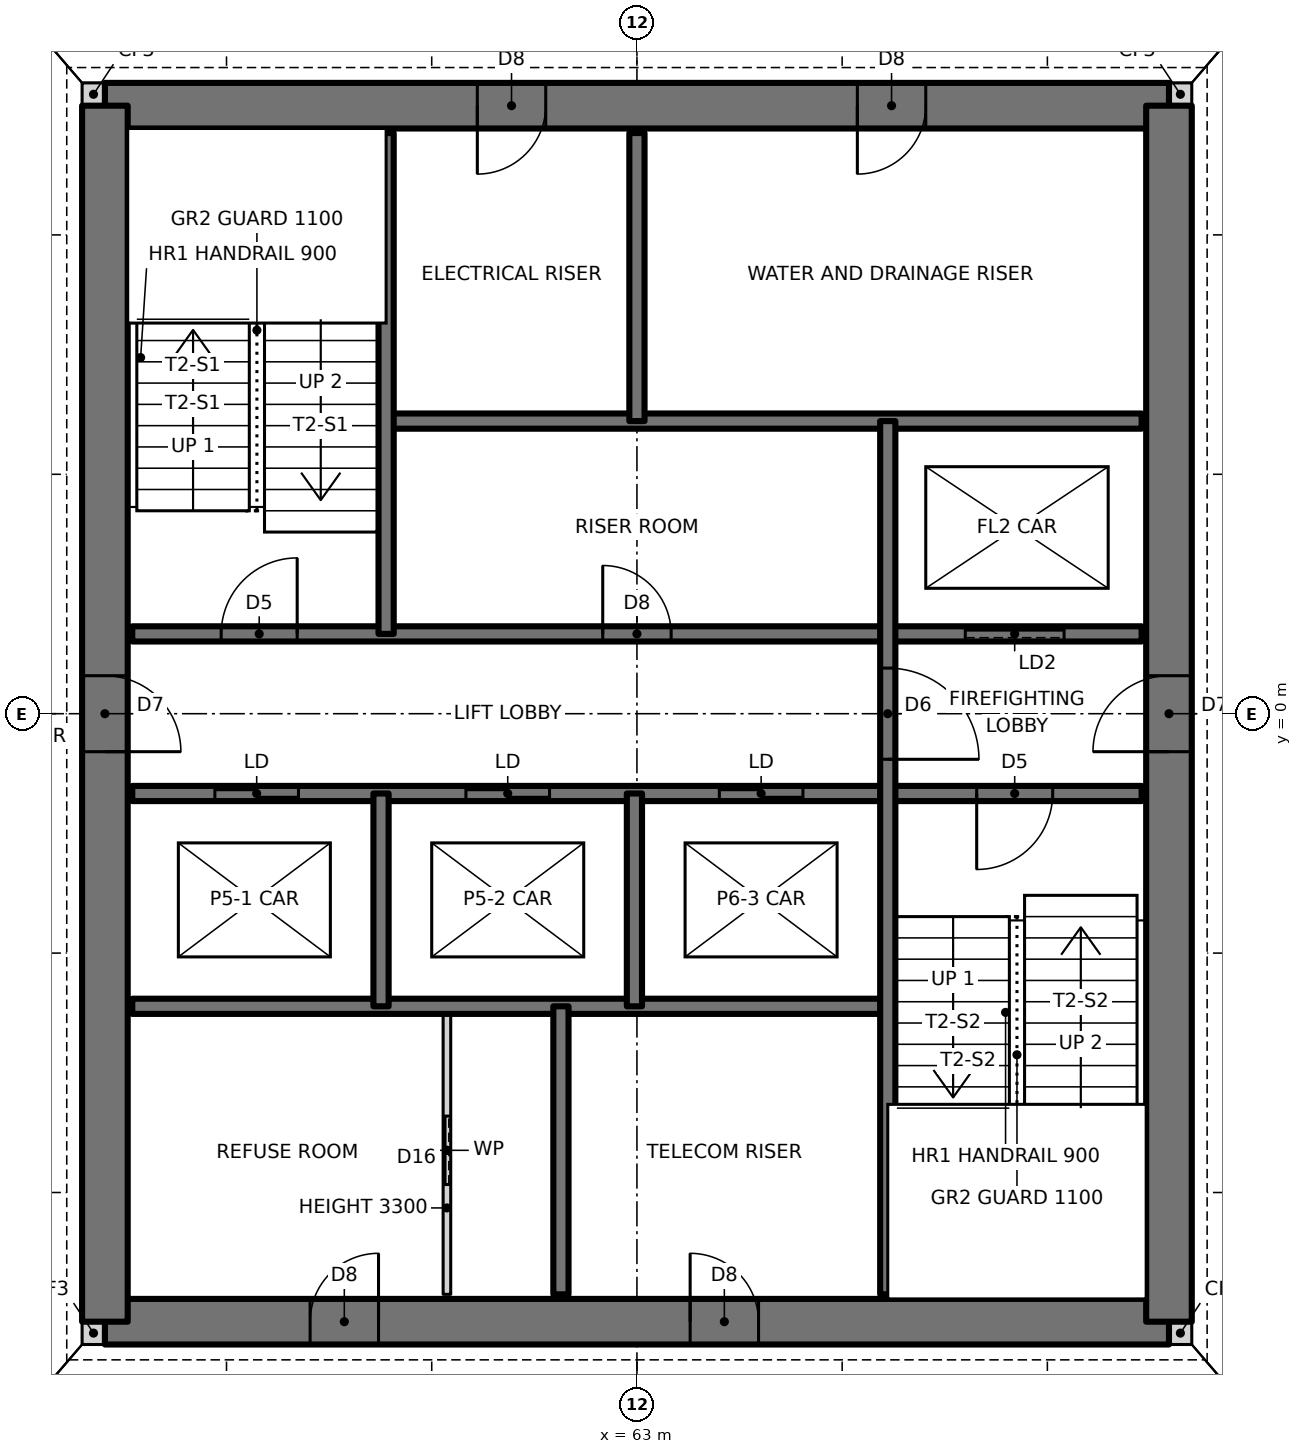
"""IFC4 building model, lengths in metres.
Left out: names, types, materials, properties, quantities, classifications, styles, units other than length and angle.
Written with IfcOpenShell. Run it as: python <this file> out.ifc"""

import sys

from ifc_helpers import new_model, si_unit, direction, frame, frame_2d, origin, place, context, subcontext, project, spatial, rectangle, extrude, element, fill, save


model = new_model("IFC4")
c1 = context("Model", 3, precision=1e-05, world=origin(), true_north=direction((0.0, 1.0)))
c2 = subcontext(c1, "Body", "Model", "MODEL_VIEW")
j1 = project(units=[si_unit("LENGTHUNIT", "METRE"), si_unit("PLANEANGLEUNIT", "RADIAN")], contexts=[c1])
p1 = place(None, origin())
s1 = spatial("IfcSite", under=j1, at=p1, CompositionType="ELEMENT")
p2 = place(p1, origin())
s2 = spatial("IfcBuilding", under=s1, at=p2, CompositionType="ELEMENT")
p3 = place(p2, frame((0.0, 0.0, 43.0)))
s3 = spatial("IfcBuildingStorey", under=s2, at=p3, CompositionType="ELEMENT", Elevation=43.0)
for number, where, z_axis, x_axis in (
    (1, (55.7, -8.15, 0.0), (0.0, 0.0, 1.0), (1.0, 0.0, 0.0)),
    (2, (70.0, -8.15, 0.0), (0.0, 0.0, 1.0), (1.0, 0.0, 0.0)),
    (3, (70.0, 8.15, 0.0), (0.0, 0.0, 1.0), (1.0, 0.0, 0.0)),
    (4, (55.7, 8.15, 0.0), (0.0, 0.0, 1.0), (1.0, 0.0, 0.0)),
):
    element("IfcWall", number, at=place(p3, frame(where, z_axis=z_axis, x_axis=x_axis)), inside=s3, PredefinedType="SOLIDWALL", context=c2, shape_type="SweptSolid", body=[
        extrude(rectangle(XDim=0.3, YDim=0.3, at=frame_2d((0.15, 0.0))), origin(), (0.0, 0.0, 1.0), 3.5),
    ])
p4 = place(p3, frame((56.0, -8.0, 0.0), z_axis=(0.0, 0.0, 1.0), x_axis=(1.0, 0.0, 0.0)))
e5 = element("IfcWall", 5, at=p4, inside=s3, PredefinedType="SHEAR", context=c2, shape_type="SweptSolid", body=[
    extrude(rectangle(XDim=14.0, YDim=0.6, at=frame_2d((7.0, 0.0))), origin(), (0.0, 0.0, 1.0), 3.5),
])
p5 = place(p4, frame((2.7, 0.0, 0.0)))
e6 = element("IfcOpeningElement", 6, at=p5, cuts=e5, PredefinedType="OPENING", context=c2, shape_type="SweptSolid", body=[
    extrude(rectangle(XDim=0.9, YDim=2.1, at=frame_2d((0.45, 1.05))), frame((0.0, 0.31, 0.0), z_axis=(0.0, -1.0, 0.0), x_axis=(1.0, 0.0, 0.0)), (0.0, 0.0, 1.0), 0.62),
])
p6 = place(p4, frame((7.7, 0.0, 0.0)))
e7 = element("IfcOpeningElement", 7, at=p6, cuts=e5, PredefinedType="OPENING", context=c2, shape_type="SweptSolid", body=[
    extrude(rectangle(XDim=0.9, YDim=2.1, at=frame_2d((0.45, 1.05))), frame((0.0, 0.31, 0.0), z_axis=(0.0, -1.0, 0.0), x_axis=(1.0, 0.0, 0.0)), (0.0, 0.0, 1.0), 0.62),
])
p7 = place(p3, frame((70.0, 8.0, 0.0), z_axis=(0.0, 0.0, 1.0), x_axis=(-1.0, 0.0, 0.0)))
e8 = element("IfcWall", 8, at=p7, inside=s3, PredefinedType="SHEAR", context=c2, shape_type="SweptSolid", body=[
    extrude(rectangle(XDim=14.0, YDim=0.6, at=frame_2d((7.0, 0.0))), origin(), (0.0, 0.0, 1.0), 3.5),
])
p8 = place(p7, frame((8.2, 0.0, 0.0)))
e9 = element("IfcOpeningElement", 9, at=p8, cuts=e8, PredefinedType="OPENING", context=c2, shape_type="SweptSolid", body=[
    extrude(rectangle(XDim=0.9, YDim=2.1, at=frame_2d((0.45, 1.05))), frame((0.0, 0.31, 0.0), z_axis=(0.0, -1.0, 0.0), x_axis=(1.0, 0.0, 0.0)), (0.0, 0.0, 1.0), 0.62),
])
p9 = place(p7, frame((3.2, 0.0, 0.0)))
e10 = element("IfcOpeningElement", 10, at=p9, cuts=e8, PredefinedType="OPENING", context=c2, shape_type="SweptSolid", body=[
    extrude(rectangle(XDim=0.9, YDim=2.1, at=frame_2d((0.45, 1.05))), frame((0.0, 0.31, 0.0), z_axis=(0.0, -1.0, 0.0), x_axis=(1.0, 0.0, 0.0)), (0.0, 0.0, 1.0), 0.62),
])
p10 = place(p3, frame((70.0, -8.0, 0.0), z_axis=(0.0, 0.0, 1.0), x_axis=(0.0, 1.0, 0.0)))
e11 = element("IfcWall", 11, at=p10, inside=s3, PredefinedType="SHEAR", context=c2, shape_type="SweptSolid", body=[
    extrude(rectangle(XDim=16.0, YDim=0.6, at=frame_2d((8.0, 0.0))), origin(), (0.0, 0.0, 1.0), 3.5),
])
p11 = place(p10, frame((7.5, 0.0, 0.0)))
e12 = element("IfcOpeningElement", 12, at=p11, cuts=e11, PredefinedType="OPENING", context=c2, shape_type="SweptSolid", body=[
    extrude(rectangle(XDim=1.0, YDim=2.1, at=frame_2d((0.5, 1.05))), frame((0.0, 0.31, 0.0), z_axis=(0.0, -1.0, 0.0), x_axis=(1.0, 0.0, 0.0)), (0.0, 0.0, 1.0), 0.62),
])
p12 = place(p3, frame((56.0, 8.0, 0.0), z_axis=(0.0, 0.0, 1.0), x_axis=(0.0, -1.0, 0.0)))
e13 = element("IfcWall", 13, at=p12, inside=s3, PredefinedType="SHEAR", context=c2, shape_type="SweptSolid", body=[
    extrude(rectangle(XDim=16.0, YDim=0.6, at=frame_2d((8.0, 0.0))), origin(), (0.0, 0.0, 1.0), 3.5),
])
p13 = place(p12, frame((7.5, 0.0, 0.0)))
e14 = element("IfcOpeningElement", 14, at=p13, cuts=e13, PredefinedType="OPENING", context=c2, shape_type="SweptSolid", body=[
    extrude(rectangle(XDim=1.0, YDim=2.1, at=frame_2d((0.5, 1.05))), frame((0.0, 0.31, 0.0), z_axis=(0.0, -1.0, 0.0), x_axis=(1.0, 0.0, 0.0)), (0.0, 0.0, 1.0), 0.62),
])
p14 = place(p3, frame((56.36, -3.85, 0.0), z_axis=(0.0, 0.0, 1.0), x_axis=(1.0, 0.0, 0.0)))
e15 = element("IfcWall", 15, at=p14, inside=s3, PredefinedType="SOLIDWALL", context=c2, shape_type="SweptSolid", body=[
    extrude(rectangle(XDim=9.94, YDim=0.2, at=frame_2d((4.97, 0.0))), origin(), (0.0, 0.0, 1.0), 3.5),
])
p15 = place(p3, frame((56.36, -1.05, 0.0), z_axis=(0.0, 0.0, 1.0), x_axis=(1.0, 0.0, 0.0)))
e16 = element("IfcWall", 16, at=p15, inside=s3, PredefinedType="SOLIDWALL", context=c2, shape_type="SweptSolid", body=[
    extrude(rectangle(XDim=13.28, YDim=0.2, at=frame_2d((6.64, 0.0))), origin(), (0.0, 0.0, 1.0), 3.5),
])
p16 = place(p15, frame((11.11, 0.0, 0.0)))
e17 = element("IfcOpeningElement", 17, at=p16, cuts=e16, PredefinedType="OPENING", context=c2, shape_type="SweptSolid", body=[
    extrude(rectangle(XDim=1.0, YDim=2.1, at=frame_2d((0.5, 1.05))), frame((0.0, 0.11, 0.0), z_axis=(0.0, -1.0, 0.0), x_axis=(1.0, 0.0, 0.0)), (0.0, 0.0, 1.0), 0.22),
])
p17 = place(p15, frame((1.087, 0.0, 0.0)))
e18 = element("IfcOpeningElement", 18, at=p17, cuts=e16, PredefinedType="OPENING", context=c2, shape_type="SweptSolid", body=[
    extrude(rectangle(XDim=1.1, YDim=2.1, at=frame_2d((0.55, 1.05))), frame((0.0, 0.11, 0.0), z_axis=(0.0, -1.0, 0.0), x_axis=(1.0, 0.0, 0.0)), (0.0, 0.0, 1.0), 0.22),
])
p18 = place(p15, frame((4.39, 0.0, 0.0)))
e19 = element("IfcOpeningElement", 19, at=p18, cuts=e16, PredefinedType="OPENING", context=c2, shape_type="SweptSolid", body=[
    extrude(rectangle(XDim=1.1, YDim=2.1, at=frame_2d((0.55, 1.05))), frame((0.0, 0.11, 0.0), z_axis=(0.0, -1.0, 0.0), x_axis=(1.0, 0.0, 0.0)), (0.0, 0.0, 1.0), 0.22),
])
p19 = place(p15, frame((7.724, 0.0, 0.0)))
e20 = element("IfcOpeningElement", 20, at=p19, cuts=e16, PredefinedType="OPENING", context=c2, shape_type="SweptSolid", body=[
    extrude(rectangle(XDim=1.1, YDim=2.1, at=frame_2d((0.55, 1.05))), frame((0.0, 0.11, 0.0), z_axis=(0.0, -1.0, 0.0), x_axis=(1.0, 0.0, 0.0)), (0.0, 0.0, 1.0), 0.22),
])
p20 = place(p3, frame((56.36, 1.05, 0.0), z_axis=(0.0, 0.0, 1.0), x_axis=(1.0, 0.0, 0.0)))
e21 = element("IfcWall", 21, at=p20, inside=s3, PredefinedType="SOLIDWALL", context=c2, shape_type="SweptSolid", body=[
    extrude(rectangle(XDim=13.28, YDim=0.2, at=frame_2d((6.64, 0.0))), origin(), (0.0, 0.0, 1.0), 3.5),
])
p21 = place(p20, frame((1.17, 0.0, 0.0)))
e22 = element("IfcOpeningElement", 22, at=p21, cuts=e21, PredefinedType="OPENING", context=c2, shape_type="SweptSolid", body=[
    extrude(rectangle(XDim=1.0, YDim=2.1, at=frame_2d((0.5, 1.05))), frame((0.0, 0.11, 0.0), z_axis=(0.0, -1.0, 0.0), x_axis=(1.0, 0.0, 0.0)), (0.0, 0.0, 1.0), 0.22),
])
p22 = place(p20, frame((6.19, 0.0, 0.0)))
e23 = element("IfcOpeningElement", 23, at=p22, cuts=e21, PredefinedType="OPENING", context=c2, shape_type="SweptSolid", body=[
    extrude(rectangle(XDim=0.9, YDim=2.1, at=frame_2d((0.45, 1.05))), frame((0.0, 0.11, 0.0), z_axis=(0.0, -1.0, 0.0), x_axis=(1.0, 0.0, 0.0)), (0.0, 0.0, 1.0), 0.22),
])
p23 = place(p20, frame((10.96, 0.0, 0.0)))
e24 = element("IfcOpeningElement", 24, at=p23, cuts=e21, PredefinedType="OPENING", context=c2, shape_type="SweptSolid", body=[
    extrude(rectangle(XDim=1.3, YDim=2.1, at=frame_2d((0.65, 1.05))), frame((0.0, 0.11, 0.0), z_axis=(0.0, -1.0, 0.0), x_axis=(1.0, 0.0, 0.0)), (0.0, 0.0, 1.0), 0.22),
])
p24 = place(p3, frame((59.7, 3.85, 0.0), z_axis=(0.0, 0.0, 1.0), x_axis=(1.0, 0.0, 0.0)))
e25 = element("IfcWall", 25, at=p24, inside=s3, PredefinedType="SOLIDWALL", context=c2, shape_type="SweptSolid", body=[
    extrude(rectangle(XDim=9.94, YDim=0.2, at=frame_2d((4.97, 0.0))), origin(), (0.0, 0.0, 1.0), 3.5),
])
p25 = place(p3, frame((66.3, -7.64, 0.0), z_axis=(0.0, 0.0, 1.0), x_axis=(0.0, 1.0, 0.0)))
e26 = element("IfcWall", 26, at=p25, inside=s3, PredefinedType="SOLIDWALL", context=c2, shape_type="SweptSolid", body=[
    extrude(rectangle(XDim=11.49, YDim=0.2, at=frame_2d((5.745, 0.0))), origin(), (0.0, 0.0, 1.0), 3.5),
])
p26 = place(p25, frame((7.04, 0.0, 0.0)))
e27 = element("IfcOpeningElement", 27, at=p26, cuts=e26, PredefinedType="OPENING", context=c2, shape_type="SweptSolid", body=[
    extrude(rectangle(XDim=1.2, YDim=2.1, at=frame_2d((0.6, 1.05))), frame((0.0, 0.11, 0.0), z_axis=(0.0, -1.0, 0.0), x_axis=(1.0, 0.0, 0.0)), (0.0, 0.0, 1.0), 0.22),
])
p27 = place(p3, frame((63.0, 3.85, 0.0), z_axis=(0.0, 0.0, 1.0), x_axis=(0.0, 1.0, 0.0)))
e28 = element("IfcWall", 28, at=p27, inside=s3, PredefinedType="SOLIDWALL", context=c2, shape_type="SweptSolid", body=[
    extrude(rectangle(XDim=3.79, YDim=0.2, at=frame_2d((1.895, 0.0))), origin(), (0.0, 0.0, 1.0), 3.5),
])
p28 = place(p3, frame((62.967, -3.85, 0.0), z_axis=(0.0, 0.0, 1.0), x_axis=(0.0, 1.0, 0.0)))
e29 = element("IfcWall", 29, at=p28, inside=s3, PredefinedType="SOLIDWALL", context=c2, shape_type="SweptSolid", body=[
    extrude(rectangle(XDim=2.8, YDim=0.2, at=frame_2d((1.4, 0.0))), origin(), (0.0, 0.0, 1.0), 3.5),
])
p29 = place(p3, frame((62.0, -7.64, 0.0), z_axis=(0.0, 0.0, 1.0), x_axis=(0.0, 1.0, 0.0)))
e30 = element("IfcWall", 30, at=p29, inside=s3, PredefinedType="SOLIDWALL", context=c2, shape_type="SweptSolid", body=[
    extrude(rectangle(XDim=3.79, YDim=0.2, at=frame_2d((1.895, 0.0))), origin(), (0.0, 0.0, 1.0), 3.5),
])
p30 = place(p3, frame((60.5, -7.64, 0.0), z_axis=(0.0, 0.0, 1.0), x_axis=(0.0, 1.0, 0.0)))
e31 = element("IfcWall", 31, at=p30, inside=s3, PredefinedType="PARTITIONING", context=c2, shape_type="SweptSolid", body=[
    extrude(rectangle(XDim=3.79, YDim=0.1, at=frame_2d((1.895, 0.0))), origin(), (0.0, 0.0, 1.0), 3.3),
])
p31 = place(p30, frame((1.445, 0.0, 0.0)))
e32 = element("IfcOpeningElement", 32, at=p31, cuts=e31, PredefinedType="OPENING", context=c2, shape_type="SweptSolid", body=[
    extrude(rectangle(XDim=0.9, YDim=2.1, at=frame_2d((0.45, 1.05))), frame((0.0, 0.06, 0.0), z_axis=(0.0, -1.0, 0.0), x_axis=(1.0, 0.0, 0.0)), (0.0, 0.0, 1.0), 0.12),
])
p32 = place(p3, frame((59.7, 1.05, 0.0), z_axis=(0.0, 0.0, 1.0), x_axis=(0.0, 1.0, 0.0)))
e33 = element("IfcWall", 33, at=p32, inside=s3, PredefinedType="SOLIDWALL", context=c2, shape_type="SweptSolid", body=[
    extrude(rectangle(XDim=6.59, YDim=0.2, at=frame_2d((3.295, 0.0))), origin(), (0.0, 0.0, 1.0), 3.5),
])
p33 = place(p3, frame((59.633, -3.85, 0.0), z_axis=(0.0, 0.0, 1.0), x_axis=(0.0, 1.0, 0.0)))
e34 = element("IfcWall", 34, at=p33, inside=s3, PredefinedType="SOLIDWALL", context=c2, shape_type="SweptSolid", body=[
    extrude(rectangle(XDim=2.8, YDim=0.2, at=frame_2d((1.4, 0.0))), origin(), (0.0, 0.0, 1.0), 3.5),
])
p34 = place(p21, origin())
e35 = element("IfcDoor", 35, at=p34, inside=s3, OperationType="SINGLE_SWING_RIGHT", PredefinedType="DOOR", context=c2, shape_type="SweptSolid", body=[
    extrude(rectangle(XDim=1.0, YDim=2.1, at=frame_2d((0.5, 1.05))), frame((0.0, 0.025, 0.0), z_axis=(0.0, -1.0, 0.0), x_axis=(1.0, 0.0, 0.0)), (0.0, 0.0, 1.0), 0.05),
])
fill(e22, e35)
p35 = place(p16, frame((1.0, 0.0, 0.0), z_axis=(0.0, 0.0, 1.0), x_axis=(-1.0, 0.0, 0.0)))
e36 = element("IfcDoor", 36, at=p35, inside=s3, OperationType="SINGLE_SWING_RIGHT", PredefinedType="DOOR", context=c2, shape_type="SweptSolid", body=[
    extrude(rectangle(XDim=1.0, YDim=2.1, at=frame_2d((0.5, 1.05))), frame((0.0, 0.025, 0.0), z_axis=(0.0, -1.0, 0.0), x_axis=(1.0, 0.0, 0.0)), (0.0, 0.0, 1.0), 0.05),
])
fill(e17, e36)
p36 = place(p26, frame((1.2, 0.0, 0.0), z_axis=(0.0, 0.0, 1.0), x_axis=(-1.0, 0.0, 0.0)))
e37 = element("IfcDoor", 37, at=p36, inside=s3, OperationType="SINGLE_SWING_RIGHT", PredefinedType="DOOR", context=c2, shape_type="SweptSolid", body=[
    extrude(rectangle(XDim=1.2, YDim=2.1, at=frame_2d((0.6, 1.05))), frame((0.0, 0.025, 0.0), z_axis=(0.0, -1.0, 0.0), x_axis=(1.0, 0.0, 0.0)), (0.0, 0.0, 1.0), 0.05),
])
fill(e27, e37)
p37 = place(p22, origin())
e38 = element("IfcDoor", 38, at=p37, inside=s3, OperationType="SINGLE_SWING_LEFT", PredefinedType="DOOR", context=c2, shape_type="SweptSolid", body=[
    extrude(rectangle(XDim=0.9, YDim=2.1, at=frame_2d((0.45, 1.05))), frame((0.0, 0.025, 0.0), z_axis=(0.0, -1.0, 0.0), x_axis=(1.0, 0.0, 0.0)), (0.0, 0.0, 1.0), 0.05),
])
fill(e23, e38)
p38 = place(p31, origin())
e39 = element("IfcDoor", 39, at=p38, inside=s3, OperationType="SLIDING_TO_LEFT", PredefinedType="DOOR", context=c2, shape_type="SweptSolid", body=[
    extrude(rectangle(XDim=0.9, YDim=2.1, at=frame_2d((0.45, 1.05))), frame((0.0, 0.025, 0.0), z_axis=(0.0, -1.0, 0.0), x_axis=(1.0, 0.0, 0.0)), (0.0, 0.0, 1.0), 0.05),
])
fill(e32, e39)
p39 = place(p13, origin())
e40 = element("IfcDoor", 40, at=p39, inside=s3, OperationType="SINGLE_SWING_RIGHT", PredefinedType="DOOR", context=c2, shape_type="SweptSolid", body=[
    extrude(rectangle(XDim=1.0, YDim=2.1, at=frame_2d((0.5, 1.05))), frame((0.0, 0.025, 0.0), z_axis=(0.0, -1.0, 0.0), x_axis=(1.0, 0.0, 0.0)), (0.0, 0.0, 1.0), 0.05),
])
fill(e14, e40)
p40 = place(p11, origin())
e41 = element("IfcDoor", 41, at=p40, inside=s3, OperationType="SINGLE_SWING_LEFT", PredefinedType="DOOR", context=c2, shape_type="SweptSolid", body=[
    extrude(rectangle(XDim=1.0, YDim=2.1, at=frame_2d((0.5, 1.05))), frame((0.0, 0.025, 0.0), z_axis=(0.0, -1.0, 0.0), x_axis=(1.0, 0.0, 0.0)), (0.0, 0.0, 1.0), 0.05),
])
fill(e12, e41)
p41 = place(p8, origin())
e42 = element("IfcDoor", 42, at=p41, inside=s3, OperationType="SINGLE_SWING_RIGHT", PredefinedType="DOOR", context=c2, shape_type="SweptSolid", body=[
    extrude(rectangle(XDim=0.9, YDim=2.1, at=frame_2d((0.45, 1.05))), frame((0.0, 0.025, 0.0), z_axis=(0.0, -1.0, 0.0), x_axis=(1.0, 0.0, 0.0)), (0.0, 0.0, 1.0), 0.05),
])
fill(e9, e42)
p42 = place(p9, origin())
e43 = element("IfcDoor", 43, at=p42, inside=s3, OperationType="SINGLE_SWING_RIGHT", PredefinedType="DOOR", context=c2, shape_type="SweptSolid", body=[
    extrude(rectangle(XDim=0.9, YDim=2.1, at=frame_2d((0.45, 1.05))), frame((0.0, 0.025, 0.0), z_axis=(0.0, -1.0, 0.0), x_axis=(1.0, 0.0, 0.0)), (0.0, 0.0, 1.0), 0.05),
])
fill(e10, e43)
p43 = place(p5, origin())
e44 = element("IfcDoor", 44, at=p43, inside=s3, OperationType="SINGLE_SWING_RIGHT", PredefinedType="DOOR", context=c2, shape_type="SweptSolid", body=[
    extrude(rectangle(XDim=0.9, YDim=2.1, at=frame_2d((0.45, 1.05))), frame((0.0, 0.025, 0.0), z_axis=(0.0, -1.0, 0.0), x_axis=(1.0, 0.0, 0.0)), (0.0, 0.0, 1.0), 0.05),
])
fill(e6, e44)
p44 = place(p6, origin())
e45 = element("IfcDoor", 45, at=p44, inside=s3, OperationType="SINGLE_SWING_LEFT", PredefinedType="DOOR", context=c2, shape_type="SweptSolid", body=[
    extrude(rectangle(XDim=0.9, YDim=2.1, at=frame_2d((0.45, 1.05))), frame((0.0, 0.025, 0.0), z_axis=(0.0, -1.0, 0.0), x_axis=(1.0, 0.0, 0.0)), (0.0, 0.0, 1.0), 0.05),
])
fill(e7, e45)
p45 = place(p17, origin())
e46 = element("IfcDoor", 46, at=p45, inside=s3, OperationType="DOUBLE_DOOR_SLIDING", PredefinedType="DOOR", context=c2, shape_type="SweptSolid", body=[
    extrude(rectangle(XDim=1.1, YDim=2.1, at=frame_2d((0.55, 1.05))), frame((0.0, 0.025, 0.0), z_axis=(0.0, -1.0, 0.0), x_axis=(1.0, 0.0, 0.0)), (0.0, 0.0, 1.0), 0.05),
])
fill(e18, e46)
p46 = place(p18, origin())
e47 = element("IfcDoor", 47, at=p46, inside=s3, OperationType="DOUBLE_DOOR_SLIDING", PredefinedType="DOOR", context=c2, shape_type="SweptSolid", body=[
    extrude(rectangle(XDim=1.1, YDim=2.1, at=frame_2d((0.55, 1.05))), frame((0.0, 0.025, 0.0), z_axis=(0.0, -1.0, 0.0), x_axis=(1.0, 0.0, 0.0)), (0.0, 0.0, 1.0), 0.05),
])
fill(e19, e47)
p47 = place(p19, origin())
e48 = element("IfcDoor", 48, at=p47, inside=s3, OperationType="DOUBLE_DOOR_SLIDING", PredefinedType="DOOR", context=c2, shape_type="SweptSolid", body=[
    extrude(rectangle(XDim=1.1, YDim=2.1, at=frame_2d((0.55, 1.05))), frame((0.0, 0.025, 0.0), z_axis=(0.0, -1.0, 0.0), x_axis=(1.0, 0.0, 0.0)), (0.0, 0.0, 1.0), 0.05),
])
fill(e20, e48)
p48 = place(p23, origin())
e49 = element("IfcDoor", 49, at=p48, inside=s3, OperationType="SLIDING_TO_LEFT", PredefinedType="DOOR", context=c2, shape_type="SweptSolid", body=[
    extrude(rectangle(XDim=1.3, YDim=2.1, at=frame_2d((0.65, 1.05))), frame((0.0, 0.025, 0.0), z_axis=(0.0, -1.0, 0.0), x_axis=(1.0, 0.0, 0.0)), (0.0, 0.0, 1.0), 0.05),
])
fill(e24, e49)
save(model, sys.argv[1])
